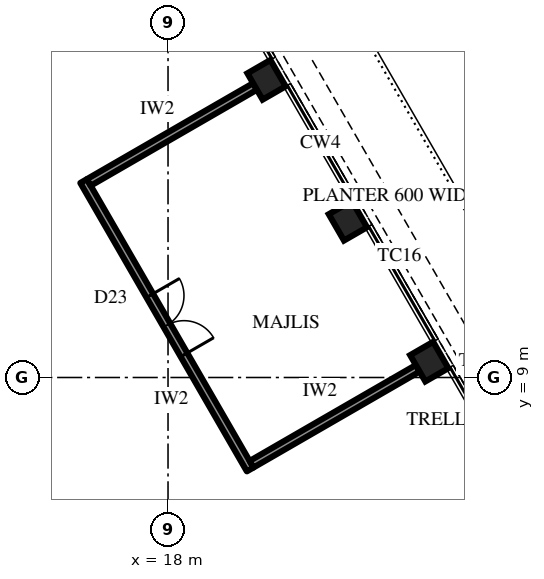
"""IFC4 building model, lengths in metres.
Left out: names, types, materials, properties, quantities, classifications, styles, units other than length and angle.
Written with IfcOpenShell. Run it as: python <this file> out.ifc"""

import sys

from ifc_helpers import new_model, si_unit, direction, frame, frame_2d, origin, origin_2d, place, context, subcontext, project, spatial, rectangle, extrude, element, fill, save


model = new_model("IFC4")
c1 = context("Model", 3, precision=1e-05, world=origin(), true_north=direction((0.0, 1.0)))
c2 = subcontext(c1, "Body", "Model", "MODEL_VIEW")
j1 = project(units=[si_unit("LENGTHUNIT", "METRE"), si_unit("PLANEANGLEUNIT", "RADIAN")], contexts=[c1])
p1 = place(None, origin())
s1 = spatial("IfcSite", under=j1, at=p1, CompositionType="ELEMENT")
p2 = place(p1, origin())
s2 = spatial("IfcBuilding", under=s1, at=p2, CompositionType="ELEMENT")
p3 = place(p2, frame((0.0, 0.0, 378.7)))
s3 = spatial("IfcBuildingStorey", under=s2, at=p3, CompositionType="ELEMENT", Elevation=378.7)
for number, where, z_axis, x_axis in (
    (1, (24.874, 9.417, 0.0), (0.0, 0.0, 1.0), (-0.5, 0.866, 0.0)),
    (2, (22.733, 13.125, 0.0), (0.0, 0.0, 1.0), (-0.5, 0.866, 0.0)),
    (3, (20.592, 16.833, 0.0), (0.0, 0.0, 1.0), (-0.5, 0.866, 0.0)),
):
    element("IfcColumn", number, at=place(p3, frame(where, z_axis=z_axis, x_axis=x_axis)), inside=s3, PredefinedType="COLUMN", context=c2, shape_type="SweptSolid", body=[
        extrude(rectangle(XDim=0.8, YDim=0.7, at=origin_2d()), origin(), (0.0, 0.0, 1.0), 4.2),
    ])
p4 = place(p3, frame((20.161, 6.58, 0.0), z_axis=(0.0, 0.0, 1.0), x_axis=(-0.500006995557, 0.86602136486, 0.0)))
e4 = element("IfcWall", 4, at=p4, inside=s3, PredefinedType="PARTITIONING", context=c2, shape_type="SweptSolid", body=[
    extrude(rectangle(XDim=8.764, YDim=0.2, at=frame_2d((4.382, 0.0))), origin(), (0.0, 0.0, 1.0), 4.0),
])
p5 = place(p4, frame((3.482, 0.0, 0.0)))
e5 = element("IfcOpeningElement", 5, at=p5, cuts=e4, PredefinedType="OPENING", context=c2, shape_type="SweptSolid", body=[
    extrude(rectangle(XDim=1.8, YDim=2.4, at=frame_2d((0.9, 1.2))), frame((0.0, 0.11, 0.0), z_axis=(0.0, -1.0, 0.0), x_axis=(1.0, 0.0, 0.0)), (0.0, 0.0, 1.0), 0.22),
])
p6 = place(p3, frame((20.198, 6.717, 0.0), z_axis=(0.0, 0.0, 1.0), x_axis=(0.866006046928, 0.500033525561, 0.0)))
e6 = element("IfcWall", 6, at=p6, inside=s3, PredefinedType="PARTITIONING", context=c2, shape_type="SweptSolid", body=[
    extrude(rectangle(XDim=5.05, YDim=0.2, at=frame_2d((2.525, 0.0))), origin(), (0.0, 0.0, 1.0), 2.992),
])
p7 = place(p3, frame((15.916, 14.133, 0.0), z_axis=(0.0, 0.0, 1.0), x_axis=(0.866018134068, 0.500012591307, 0.0)))
e7 = element("IfcWall", 7, at=p7, inside=s3, PredefinedType="PARTITIONING", context=c2, shape_type="SweptSolid", body=[
    extrude(rectangle(XDim=5.05, YDim=0.2, at=frame_2d((2.525, 0.0))), origin(), (0.0, 0.0, 1.0), 3.082),
])
p8 = place(p5, frame((1.8, 0.0, 0.0), z_axis=(0.0, 0.0, 1.0), x_axis=(-1.0, 0.0, 0.0)))
e8 = element("IfcDoor", 8, at=p8, inside=s3, OperationType="DOUBLE_DOOR_SINGLE_SWING", PredefinedType="DOOR", context=c2, shape_type="SweptSolid", body=[
    extrude(rectangle(XDim=1.8, YDim=2.4, at=frame_2d((0.9, 1.2))), frame((0.0, 0.025, 0.0), z_axis=(0.0, -1.0, 0.0), x_axis=(1.0, 0.0, 0.0)), (0.0, 0.0, 1.0), 0.05),
])
fill(e5, e8)
save(model, sys.argv[1])
